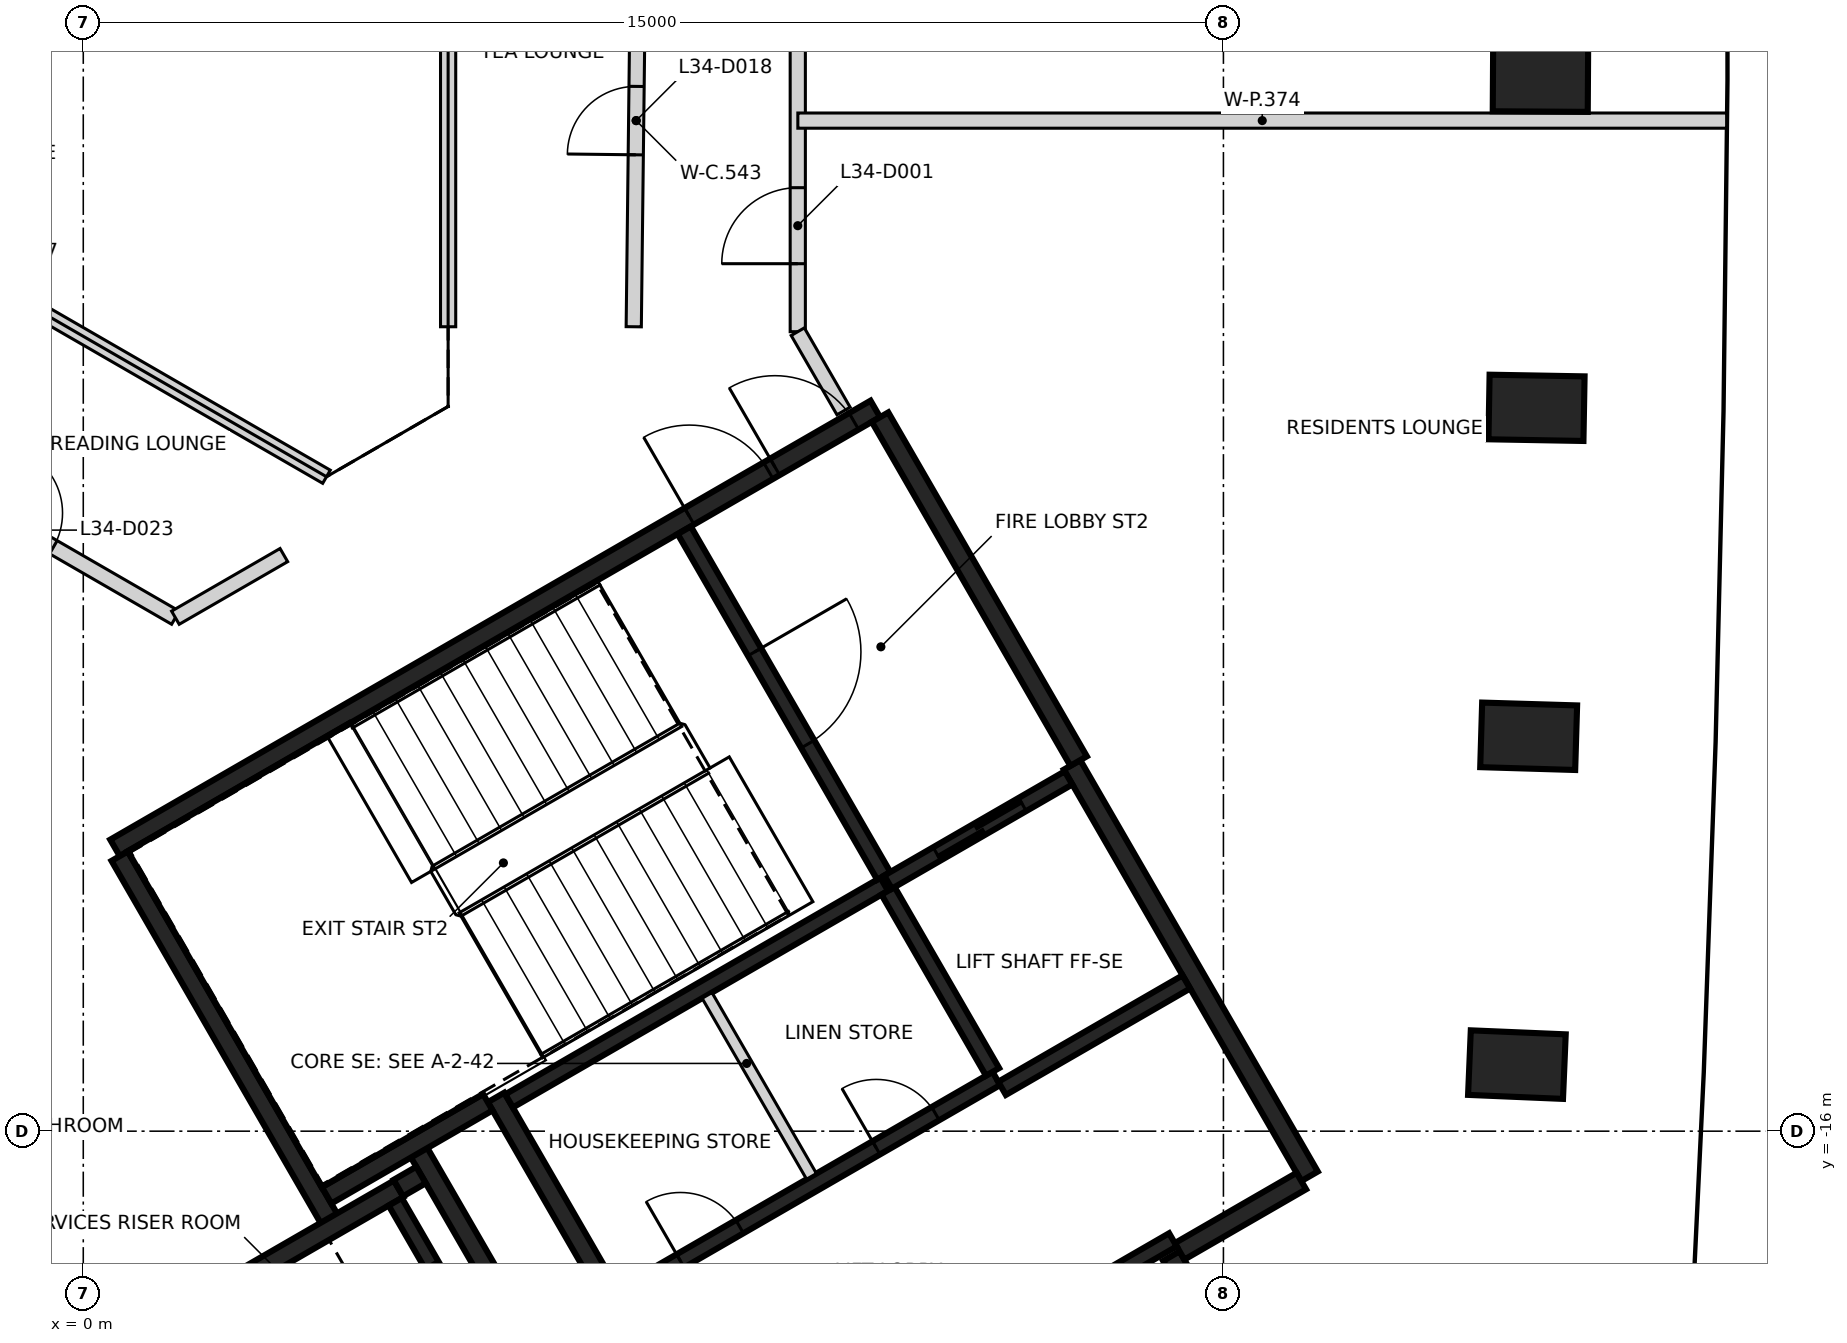
"""IFC4 building model, lengths in metres.
Left out: names, types, materials, properties, quantities, classifications, styles, units other than length and angle.
Written with IfcOpenShell. Run it as: python <this file> out.ifc"""

import sys

from ifc_helpers import new_model, si_unit, direction, frame, frame_2d, origin, origin_2d, place, context, subcontext, project, spatial, rectangle, extrude, element, fill, save


model = new_model("IFC4")
c1 = context("Model", 3, precision=1e-05, world=origin(), true_north=direction((0.0, 1.0)))
c2 = subcontext(c1, "Body", "Model", "MODEL_VIEW")
j1 = project(units=[si_unit("LENGTHUNIT", "METRE"), si_unit("PLANEANGLEUNIT", "RADIAN")], contexts=[c1])
p1 = place(None, origin())
s1 = spatial("IfcSite", under=j1, at=p1, CompositionType="ELEMENT")
p2 = place(p1, origin())
s2 = spatial("IfcBuilding", under=s1, at=p2, CompositionType="ELEMENT")
p3 = place(p2, frame((0.0, 0.0, 139.6)))
s3 = spatial("IfcBuildingStorey", under=s2, at=p3, CompositionType="ELEMENT", Elevation=139.6)
for number, where, z_axis, x_axis in (
    (1, (18.861, -15.124, -0.4), (0.0, 0.0, 1.0), (-0.999, 0.042, 0.0)),
    (2, (19.016, -10.805, -0.4), (0.0, 0.0, 1.0), (-1.0, 0.03, 0.0)),
    (3, (19.119, -6.484, -0.4), (0.0, 0.0, 1.0), (-1.0, 0.018, 0.0)),
    (4, (19.171, -2.161, -0.4), (0.0, 0.0, 1.0), (-1.0, 0.006, 0.0)),
):
    element("IfcColumn", number, at=place(p3, frame(where, z_axis=z_axis, x_axis=x_axis)), inside=s3, PredefinedType="COLUMN", context=c2, shape_type="SweptSolid", body=[
        extrude(rectangle(XDim=1.25, YDim=0.85, at=origin_2d()), origin(), (0.0, 0.0, 1.0), 3.6),
    ])
p4 = place(p3, frame((0.417, -12.273, 0.0), z_axis=(0.0, 0.0, 1.0), x_axis=(0.866021906294, 0.500006057782, 0.0)))
e5 = element("IfcWall", 5, at=p4, inside=s3, PredefinedType="SHEAR", context=c2, shape_type="SweptSolid", body=[
    extrude(rectangle(XDim=11.55, YDim=0.25, at=frame_2d((5.775, 0.0))), origin(), (0.0, 0.0, 1.0), 3.2),
])
p5 = place(p4, frame((10.025, 0.0, 0.0)))
e6 = element("IfcOpeningElement", 6, at=p5, cuts=e5, PredefinedType="OPENING", context=c2, shape_type="SweptSolid", body=[
    extrude(rectangle(XDim=1.2, YDim=2.1, at=frame_2d((0.6, 1.05))), frame((0.0, 0.135, 0.0), z_axis=(0.0, -1.0, 0.0), x_axis=(1.0, 0.0, 0.0)), (0.0, 0.0, 1.0), 0.27),
])
p6 = place(p4, frame((8.725, 0.0, 0.0)))
e7 = element("IfcOpeningElement", 7, at=p6, cuts=e5, PredefinedType="OPENING", context=c2, shape_type="SweptSolid", body=[
    extrude(rectangle(XDim=1.2, YDim=2.1, at=frame_2d((0.6, 1.05))), frame((0.0, 0.135, 0.0), z_axis=(0.0, -1.0, 0.0), x_axis=(1.0, 0.0, 0.0)), (0.0, 0.0, 1.0), 0.27),
])
p7 = place(p3, frame((13.008, -11.181, 0.0), z_axis=(0.0, 0.0, 1.0), x_axis=(0.500004234368, -0.866022959057, 0.0)))
e8 = element("IfcWall", 8, at=p7, inside=s3, PredefinedType="SHEAR", context=c2, shape_type="SweptSolid", body=[
    extrude(rectangle(XDim=6.25, YDim=0.25, at=frame_2d((3.125, 0.0))), origin(), (0.0, 0.0, 1.0), 3.2),
])
p8 = place(p3, frame((3.235, -17.153, 0.0), z_axis=(0.0, 0.0, 1.0), x_axis=(-0.500008851346, 0.866020293397, 0.0)))
e9 = element("IfcWall", 9, at=p8, inside=s3, PredefinedType="SHEAR", context=c2, shape_type="SweptSolid", body=[
    extrude(rectangle(XDim=5.51, YDim=0.25, at=frame_2d((2.755, 0.0))), origin(), (0.0, 0.0, 1.0), 3.2),
])
p9 = place(p3, frame((10.483, -6.606, 0.0), z_axis=(0.0, 0.0, 1.0), x_axis=(0.49999885962, -0.866026062182, 0.0)))
e10 = element("IfcWall", 10, at=p9, inside=s3, PredefinedType="SHEAR", context=c2, shape_type="SweptSolid", body=[
    extrude(rectangle(XDim=5.225, YDim=0.25, at=frame_2d((2.612, 0.0))), origin(), (0.0, 0.0, 1.0), 3.2),
])
p10 = place(p3, frame((7.031, -18.327, 0.0), z_axis=(0.0, 0.0, 1.0), x_axis=(-0.499971222258, 0.866042017984, 0.0)))
e11 = element("IfcWall", 11, at=p10, inside=s3, PredefinedType="SHEAR", context=c2, shape_type="SweptSolid", body=[
    extrude(rectangle(XDim=3.2, YDim=0.25, at=frame_2d((1.6, 0.0))), origin(), (0.0, 0.0, 1.0), 3.2),
])
p11 = place(p3, frame((14.315, -17.644, 0.0), z_axis=(0.0, 0.0, 1.0), x_axis=(0.500023226632, -0.866011993467, 0.0)))
e12 = element("IfcWall", 12, at=p11, inside=s3, PredefinedType="SHEAR", context=c2, shape_type="SweptSolid", body=[
    extrude(rectangle(XDim=2.974, YDim=0.25, at=frame_2d((1.487, 0.0))), origin(), (0.0, 0.0, 1.0), 3.2),
])
p12 = place(p3, frame((1.669, -18.19, 0.0), z_axis=(0.0, 0.0, 1.0), x_axis=(0.866042235819, 0.499970844928, 0.0)))
e13 = element("IfcWall", 13, at=p12, inside=s3, PredefinedType="SHEAR", context=c2, shape_type="SweptSolid", body=[
    extrude(rectangle(XDim=2.865, YDim=0.25, at=frame_2d((1.432, 0.0))), origin(), (0.0, 0.0, 1.0), 3.2),
])
p13 = place(p3, frame((4.414, -16.276, 0.0), z_axis=(0.0, 0.0, 1.0), x_axis=(0.500003324108, -0.866023484601, 0.0)))
e14 = element("IfcWall", 14, at=p13, inside=s3, PredefinedType="SHEAR", context=c2, shape_type="SweptSolid", body=[
    extrude(rectangle(XDim=3.085, YDim=0.25, at=frame_2d((1.542, 0.0))), origin(), (0.0, 0.0, 1.0), 3.2),
])
p14 = place(p3, frame((5.322, -15.619, 0.0), z_axis=(0.0, 0.0, 1.0), x_axis=(-0.866026229868, -0.499998569178, 0.0)))
e15 = element("IfcWall", 15, at=p14, inside=s3, PredefinedType="SHEAR", context=c2, shape_type="SweptSolid", body=[
    extrude(rectangle(XDim=2.449, YDim=0.25, at=frame_2d((1.225, 0.0))), origin(), (0.0, 0.0, 1.0), 3.2),
])
p15 = place(p3, frame((16.025, -16.656, 0.0), z_axis=(0.0, 0.0, 1.0), x_axis=(-0.866016279763, -0.500015802937, 0.0)))
e16 = element("IfcWall", 16, at=p15, inside=s3, PredefinedType="SHEAR", context=c2, shape_type="SweptSolid", body=[
    extrude(rectangle(XDim=1.849, YDim=0.25, at=frame_2d((0.925, 0.0))), origin(), (0.0, 0.0, 1.0), 3.2),
])
p16 = place(p3, frame((4.145, -16.749, 0.0), z_axis=(0.0, 0.0, 1.0), x_axis=(0.866185586049, 0.49972245349, 0.0)))
e17 = element("IfcWall", 17, at=p16, inside=s3, PredefinedType="SHEAR", context=c2, shape_type="SweptSolid", body=[
    extrude(rectangle(XDim=0.344, YDim=0.25, at=frame_2d((0.172, 0.0))), origin(), (0.0, 0.0, 1.0), 3.2),
])
p17 = place(p3, frame((9.052, -20.48, 0.0), z_axis=(0.0, 0.0, 1.0), x_axis=(0.866030299012, 0.499991521122, 0.0)))
e18 = element("IfcWall", 18, at=p17, inside=s3, PredefinedType="SHEAR", context=c2, shape_type="SweptSolid", body=[
    extrude(rectangle(XDim=6.1, YDim=0.2, at=frame_2d((3.05, 0.0))), origin(), (0.0, 0.0, 1.0), 3.2),
])
p18 = place(p17, frame((1.0, 0.0, 0.0)))
e19 = element("IfcOpeningElement", 19, at=p18, cuts=e18, PredefinedType="OPENING", context=c2, shape_type="SweptSolid", body=[
    extrude(rectangle(XDim=1.2, YDim=2.1, at=frame_2d((0.6, 1.05))), frame((0.0, 0.11, 0.0), z_axis=(0.0, -1.0, 0.0), x_axis=(1.0, 0.0, 0.0)), (0.0, 0.0, 1.0), 0.22),
])
p19 = place(p17, frame((4.05, 0.0, 0.0)))
e20 = element("IfcOpeningElement", 20, at=p19, cuts=e18, PredefinedType="OPENING", context=c2, shape_type="SweptSolid", body=[
    extrude(rectangle(XDim=1.2, YDim=2.1, at=frame_2d((0.6, 1.05))), frame((0.0, 0.11, 0.0), z_axis=(0.0, -1.0, 0.0), x_axis=(1.0, 0.0, 0.0)), (0.0, 0.0, 1.0), 0.22),
])
p20 = place(p3, frame((10.538, -12.752, 0.0), z_axis=(0.0, 0.0, 1.0), x_axis=(-0.866038630372, -0.499977090179, 0.0)))
e21 = element("IfcWall", 21, at=p20, inside=s3, PredefinedType="SHEAR", context=c2, shape_type="SweptSolid", body=[
    extrude(rectangle(XDim=5.699, YDim=0.2, at=frame_2d((2.85, 0.0))), origin(), (0.0, 0.0, 1.0), 3.2),
])
p21 = place(p3, frame((7.077, -18.156, 0.0), z_axis=(0.0, 0.0, 1.0), x_axis=(0.866038630372, 0.499977090179, 0.0)))
e22 = element("IfcWall", 22, at=p21, inside=s3, PredefinedType="SHEAR", context=c2, shape_type="SweptSolid", body=[
    extrude(rectangle(XDim=5.699, YDim=0.2, at=frame_2d((2.85, 0.0))), origin(), (0.0, 0.0, 1.0), 3.2),
])
p22 = place(p21, frame((0.899, 0.0, 0.0)))
e23 = element("IfcOpeningElement", 23, at=p22, cuts=e22, PredefinedType="OPENING", context=c2, shape_type="SweptSolid", body=[
    extrude(rectangle(XDim=0.9, YDim=2.1, at=frame_2d((0.45, 1.05))), frame((0.0, 0.11, 0.0), z_axis=(0.0, -1.0, 0.0), x_axis=(1.0, 0.0, 0.0)), (0.0, 0.0, 1.0), 0.22),
])
p23 = place(p21, frame((3.874, 0.0, 0.0)))
e24 = element("IfcOpeningElement", 24, at=p23, cuts=e22, PredefinedType="OPENING", context=c2, shape_type="SweptSolid", body=[
    extrude(rectangle(XDim=0.9, YDim=2.1, at=frame_2d((0.45, 1.05))), frame((0.0, 0.11, 0.0), z_axis=(0.0, -1.0, 0.0), x_axis=(1.0, 0.0, 0.0)), (0.0, 0.0, 1.0), 0.22),
])
p24 = place(p3, frame((7.906, -8.094, 0.0), z_axis=(0.0, 0.0, 1.0), x_axis=(0.500024287448, -0.866011380966, 0.0)))
e25 = element("IfcWall", 25, at=p24, inside=s3, PredefinedType="SHEAR", context=c2, shape_type="SweptSolid", body=[
    extrude(rectangle(XDim=5.251, YDim=0.2, at=frame_2d((2.625, 0.0))), origin(), (0.0, 0.0, 1.0), 3.2),
])
p25 = place(p24, frame((1.849, 0.0, 0.0)))
e26 = element("IfcOpeningElement", 26, at=p25, cuts=e25, PredefinedType="OPENING", context=c2, shape_type="SweptSolid", body=[
    extrude(rectangle(XDim=1.4, YDim=2.1, at=frame_2d((0.7, 1.05))), frame((0.0, 0.11, 0.0), z_axis=(0.0, -1.0, 0.0), x_axis=(1.0, 0.0, 0.0)), (0.0, 0.0, 1.0), 0.22),
])
p26 = place(p3, frame((5.503, -19.352, 0.0), z_axis=(0.0, 0.0, 1.0), x_axis=(-0.499986818241, 0.866033014143, 0.0)))
e27 = element("IfcWall", 27, at=p26, inside=s3, PredefinedType="SHEAR", context=c2, shape_type="SweptSolid", body=[
    extrude(rectangle(XDim=2.798, YDim=0.2, at=frame_2d((1.399, 0.0))), origin(), (0.0, 0.0, 1.0), 3.2),
])
p27 = place(p26, frame((0.949, 0.0, 0.0)))
e28 = element("IfcOpeningElement", 28, at=p27, cuts=e27, PredefinedType="OPENING", context=c2, shape_type="SweptSolid", body=[
    extrude(rectangle(XDim=0.9, YDim=2.1, at=frame_2d((0.45, 1.05))), frame((0.0, 0.11, 0.0), z_axis=(0.0, -1.0, 0.0), x_axis=(1.0, 0.0, 0.0)), (0.0, 0.0, 1.0), 0.22),
])
p28 = place(p3, frame((11.963, -15.22, 0.0), z_axis=(0.0, 0.0, 1.0), x_axis=(-0.500034990121, 0.866005201286, 0.0)))
e29 = element("IfcWall", 29, at=p28, inside=s3, PredefinedType="SHEAR", context=c2, shape_type="SweptSolid", body=[
    extrude(rectangle(XDim=2.75, YDim=0.2, at=frame_2d((1.375, 0.0))), origin(), (0.0, 0.0, 1.0), 3.2),
])
p29 = place(p3, frame((10.587, -12.723, 0.0), z_axis=(0.0, 0.0, 1.0), x_axis=(0.866037306777, 0.499979382845, 0.0)))
e30 = element("IfcWall", 30, at=p29, inside=s3, PredefinedType="SHEAR", context=c2, shape_type="SweptSolid", body=[
    extrude(rectangle(XDim=2.742, YDim=0.2, at=frame_2d((1.371, 0.0))), origin(), (0.0, 0.0, 1.0), 3.2),
])
p30 = place(p29, frame((0.743, 0.0, 0.0)))
e31 = element("IfcOpeningElement", 31, at=p30, cuts=e30, PredefinedType="OPENING", context=c2, shape_type="SweptSolid", body=[
    extrude(rectangle(XDim=1.3, YDim=2.1, at=frame_2d((0.65, 1.05))), frame((0.0, 0.11, 0.0), z_axis=(0.0, -1.0, 0.0), x_axis=(1.0, 0.0, 0.0)), (0.0, 0.0, 1.0), 0.22),
])
p31 = place(p3, frame((14.512, -14.037, 0.0), z_axis=(0.0, 0.0, 1.0), x_axis=(-0.866044696403, -0.499966582715, 0.0)))
e32 = element("IfcWall", 32, at=p31, inside=s3, PredefinedType="SHEAR", context=c2, shape_type="SweptSolid", body=[
    extrude(rectangle(XDim=2.799, YDim=0.2, at=frame_2d((1.399, 0.0))), origin(), (0.0, 0.0, 1.0), 3.2),
])
p32 = place(p3, frame((8.207, -14.214, 0.0), z_axis=(0.0, 0.0, 1.0), x_axis=(0.50002746344, -0.86600954718, 0.0)))
e33 = element("IfcWall", 33, at=p32, inside=s3, PredefinedType="PARTITIONING", context=c2, shape_type="SweptSolid", body=[
    extrude(rectangle(XDim=2.748, YDim=0.15, at=frame_2d((1.374, 0.0))), origin(), (0.0, 0.0, 1.0), 3.2),
])
p33 = place(p3, frame((-7.455, -4.24, 0.0), z_axis=(0.0, 0.0, 1.0), x_axis=(0.866015783746, -0.500016662025, 0.0)))
e34 = element("IfcWall", 34, at=p33, inside=s3, PredefinedType="PARTITIONING", context=c2, shape_type="SweptSolid", body=[
    extrude(rectangle(XDim=10.009, YDim=0.2, at=frame_2d((5.004, 0.0))), origin(), (0.0, 0.0, 1.0), 3.2),
])
p34 = place(p33, frame((2.262, 0.0, 0.0)))
e35 = element("IfcOpeningElement", 35, at=p34, cuts=e34, PredefinedType="OPENING", context=c2, shape_type="SweptSolid", body=[
    extrude(rectangle(XDim=0.9, YDim=2.1, at=frame_2d((0.45, 1.05))), frame((0.0, 0.11, 0.0), z_axis=(0.0, -1.0, 0.0), x_axis=(1.0, 0.0, 0.0)), (0.0, 0.0, 1.0), 0.22),
])
p35 = place(p33, frame((7.254, 0.0, 0.0)))
e36 = element("IfcOpeningElement", 36, at=p35, cuts=e34, PredefinedType="OPENING", context=c2, shape_type="SweptSolid", body=[
    extrude(rectangle(XDim=0.9, YDim=2.1, at=frame_2d((0.45, 1.05))), frame((0.0, 0.11, 0.0), z_axis=(0.0, -1.0, 0.0), x_axis=(1.0, 0.0, 0.0)), (0.0, 0.0, 1.0), 0.22),
])
p36 = place(p3, frame((1.212, -9.245, 0.0), z_axis=(0.0, 0.0, 1.0), x_axis=(0.86593636949, 0.500154180222, 0.0)))
e37 = element("IfcWall", 37, at=p36, inside=s3, PredefinedType="PARTITIONING", context=c2, shape_type="SweptSolid", body=[
    extrude(rectangle(XDim=1.648, YDim=0.2, at=frame_2d((0.824, 0.0))), origin(), (0.0, 0.0, 1.0), 3.2),
])
p37 = place(p3, frame((7.242, -5.417, 0.0), z_axis=(0.0, 0.0, 1.0), x_axis=(0.01179195138, 0.999930472524, 0.0)))
e38 = element("IfcWall", 38, at=p37, inside=s3, PredefinedType="PARTITIONING", context=c2, shape_type="SweptSolid", body=[
    extrude(rectangle(XDim=5.425, YDim=0.2, at=frame_2d((2.712, 0.0))), origin(), (0.0, 0.0, 1.0), 3.2),
])
p38 = place(p37, frame((2.262, 0.0, 0.0)))
e39 = element("IfcOpeningElement", 39, at=p38, cuts=e38, PredefinedType="OPENING", context=c2, shape_type="SweptSolid", body=[
    extrude(rectangle(XDim=0.9, YDim=2.1, at=frame_2d((0.45, 1.05))), frame((0.0, 0.11, 0.0), z_axis=(0.0, -1.0, 0.0), x_axis=(1.0, 0.0, 0.0)), (0.0, 0.0, 1.0), 0.22),
])
p39 = place(p3, frame((9.4, -5.482, 0.0), z_axis=(0.0, 0.0, 1.0), x_axis=(0.0, 1.0, 0.0)))
e40 = element("IfcWall", 40, at=p39, inside=s3, PredefinedType="PARTITIONING", context=c2, shape_type="SweptSolid", body=[
    extrude(rectangle(XDim=9.56, YDim=0.2, at=frame_2d((4.78, 0.0))), origin(), (0.0, 0.0, 1.0), 3.2),
])
p40 = place(p39, frame((0.895, 0.0, 0.0)))
e41 = element("IfcOpeningElement", 41, at=p40, cuts=e40, PredefinedType="OPENING", context=c2, shape_type="SweptSolid", body=[
    extrude(rectangle(XDim=1.0, YDim=2.1, at=frame_2d((0.5, 1.05))), frame((0.0, 0.11, 0.0), z_axis=(0.0, -1.0, 0.0), x_axis=(1.0, 0.0, 0.0)), (0.0, 0.0, 1.0), 0.22),
])
p41 = place(p39, frame((5.462, 0.0, 0.0)))
e42 = element("IfcOpeningElement", 42, at=p41, cuts=e40, PredefinedType="OPENING", context=c2, shape_type="SweptSolid", body=[
    extrude(rectangle(XDim=1.4, YDim=2.1, at=frame_2d((0.7, 1.05))), frame((0.0, 0.11, 0.0), z_axis=(0.0, -1.0, 0.0), x_axis=(1.0, 0.0, 0.0)), (0.0, 0.0, 1.0), 0.22),
])
p42 = place(p3, frame((9.4, -5.482, 0.0), z_axis=(0.0, 0.0, 1.0), x_axis=(0.499909562097, -0.866077611837, 0.0)))
e43 = element("IfcWall", 43, at=p42, inside=s3, PredefinedType="PARTITIONING", context=c2, shape_type="SweptSolid", body=[
    extrude(rectangle(XDim=1.205, YDim=0.2, at=frame_2d((0.603, 0.0))), origin(), (0.0, 0.0, 1.0), 3.2),
])
p43 = place(p3, frame((-6.155, -1.989, 0.0), z_axis=(0.0, 0.0, 1.0), x_axis=(0.866009062299, -0.500028303215, 0.0)))
e44 = element("IfcWall", 44, at=p43, inside=s3, PredefinedType="PARTITIONING", context=c2, shape_type="SweptSolid", body=[
    extrude(rectangle(XDim=10.802, YDim=0.2, at=frame_2d((5.401, 0.0))), origin(), (0.0, 0.0, 1.0), 2.3),
])
p44 = place(p3, frame((4.8, -5.417, 0.0), z_axis=(0.0, 0.0, 1.0), x_axis=(0.0, 1.0, 0.0)))
e45 = element("IfcWall", 45, at=p44, inside=s3, PredefinedType="PARTITIONING", context=c2, shape_type="SweptSolid", body=[
    extrude(rectangle(XDim=10.824, YDim=0.2, at=frame_2d((5.412, 0.0))), origin(), (0.0, 0.0, 1.0), 2.3),
])
p45 = place(p3, frame((9.401, -2.705, 0.0), z_axis=(0.0, 0.0, 1.0), x_axis=(1.0, 0.0, 0.0)))
e46 = element("IfcWall", 46, at=p45, inside=s3, PredefinedType="PARTITIONING", context=c2, shape_type="SweptSolid", body=[
    extrude(rectangle(XDim=12.219, YDim=0.2, at=frame_2d((6.11, 0.0))), origin(), (0.0, 0.0, 1.0), 2.3),
])
p46 = place(p30, origin())
e47 = element("IfcDoor", 47, at=p46, inside=s3, OperationType="SLIDING_TO_LEFT", PredefinedType="DOOR", context=c2, shape_type="SweptSolid", body=[
    extrude(rectangle(XDim=1.3, YDim=2.1, at=frame_2d((0.65, 1.05))), frame((0.0, 0.025, 0.0), z_axis=(0.0, -1.0, 0.0), x_axis=(1.0, 0.0, 0.0)), (0.0, 0.0, 1.0), 0.05),
])
fill(e31, e47)
p47 = place(p5, origin())
e48 = element("IfcDoor", 48, at=p47, inside=s3, OperationType="SINGLE_SWING_LEFT", PredefinedType="DOOR", context=c2, shape_type="SweptSolid", body=[
    extrude(rectangle(XDim=1.2, YDim=2.1, at=frame_2d((0.6, 1.05))), frame((0.0, 0.025, 0.0), z_axis=(0.0, -1.0, 0.0), x_axis=(1.0, 0.0, 0.0)), (0.0, 0.0, 1.0), 0.05),
])
fill(e6, e48)
p48 = place(p6, origin())
e49 = element("IfcDoor", 49, at=p48, inside=s3, OperationType="SINGLE_SWING_RIGHT", PredefinedType="DOOR", context=c2, shape_type="SweptSolid", body=[
    extrude(rectangle(XDim=1.2, YDim=2.1, at=frame_2d((0.6, 1.05))), frame((0.0, 0.025, 0.0), z_axis=(0.0, -1.0, 0.0), x_axis=(1.0, 0.0, 0.0)), (0.0, 0.0, 1.0), 0.05),
])
fill(e7, e49)
p49 = place(p25, origin())
e50 = element("IfcDoor", 50, at=p49, inside=s3, OperationType="SINGLE_SWING_LEFT", PredefinedType="DOOR", context=c2, shape_type="SweptSolid", body=[
    extrude(rectangle(XDim=1.4, YDim=2.1, at=frame_2d((0.7, 1.05))), frame((0.0, 0.025, 0.0), z_axis=(0.0, -1.0, 0.0), x_axis=(1.0, 0.0, 0.0)), (0.0, 0.0, 1.0), 0.05),
])
fill(e26, e50)
p50 = place(p22, origin())
e51 = element("IfcDoor", 51, at=p50, inside=s3, OperationType="SINGLE_SWING_RIGHT", PredefinedType="DOOR", context=c2, shape_type="SweptSolid", body=[
    extrude(rectangle(XDim=0.9, YDim=2.1, at=frame_2d((0.45, 1.05))), frame((0.0, 0.025, 0.0), z_axis=(0.0, -1.0, 0.0), x_axis=(1.0, 0.0, 0.0)), (0.0, 0.0, 1.0), 0.05),
])
fill(e23, e51)
p51 = place(p23, origin())
e52 = element("IfcDoor", 52, at=p51, inside=s3, OperationType="SINGLE_SWING_LEFT", PredefinedType="DOOR", context=c2, shape_type="SweptSolid", body=[
    extrude(rectangle(XDim=0.9, YDim=2.1, at=frame_2d((0.45, 1.05))), frame((0.0, 0.025, 0.0), z_axis=(0.0, -1.0, 0.0), x_axis=(1.0, 0.0, 0.0)), (0.0, 0.0, 1.0), 0.05),
])
fill(e24, e52)
p52 = place(p40, frame((1.0, 0.0, 0.0), z_axis=(0.0, 0.0, 1.0), x_axis=(-1.0, 0.0, 0.0)))
e53 = element("IfcDoor", 53, at=p52, inside=s3, OperationType="SINGLE_SWING_LEFT", PredefinedType="DOOR", context=c2, shape_type="SweptSolid", body=[
    extrude(rectangle(XDim=1.0, YDim=2.1, at=frame_2d((0.5, 1.05))), frame((0.0, 0.025, 0.0), z_axis=(0.0, -1.0, 0.0), x_axis=(1.0, 0.0, 0.0)), (0.0, 0.0, 1.0), 0.05),
])
fill(e41, e53)
p53 = place(p38, origin())
e54 = element("IfcDoor", 54, at=p53, inside=s3, OperationType="SINGLE_SWING_LEFT", PredefinedType="DOOR", context=c2, shape_type="SweptSolid", body=[
    extrude(rectangle(XDim=0.9, YDim=2.1, at=frame_2d((0.45, 1.05))), frame((0.0, 0.025, 0.0), z_axis=(0.0, -1.0, 0.0), x_axis=(1.0, 0.0, 0.0)), (0.0, 0.0, 1.0), 0.05),
])
fill(e39, e54)
p54 = place(p35, origin())
e55 = element("IfcDoor", 55, at=p54, inside=s3, OperationType="SINGLE_SWING_LEFT", PredefinedType="DOOR", context=c2, shape_type="SweptSolid", body=[
    extrude(rectangle(XDim=0.9, YDim=2.1, at=frame_2d((0.45, 1.05))), frame((0.0, 0.025, 0.0), z_axis=(0.0, -1.0, 0.0), x_axis=(1.0, 0.0, 0.0)), (0.0, 0.0, 1.0), 0.05),
])
fill(e36, e55)
save(model, sys.argv[1])
